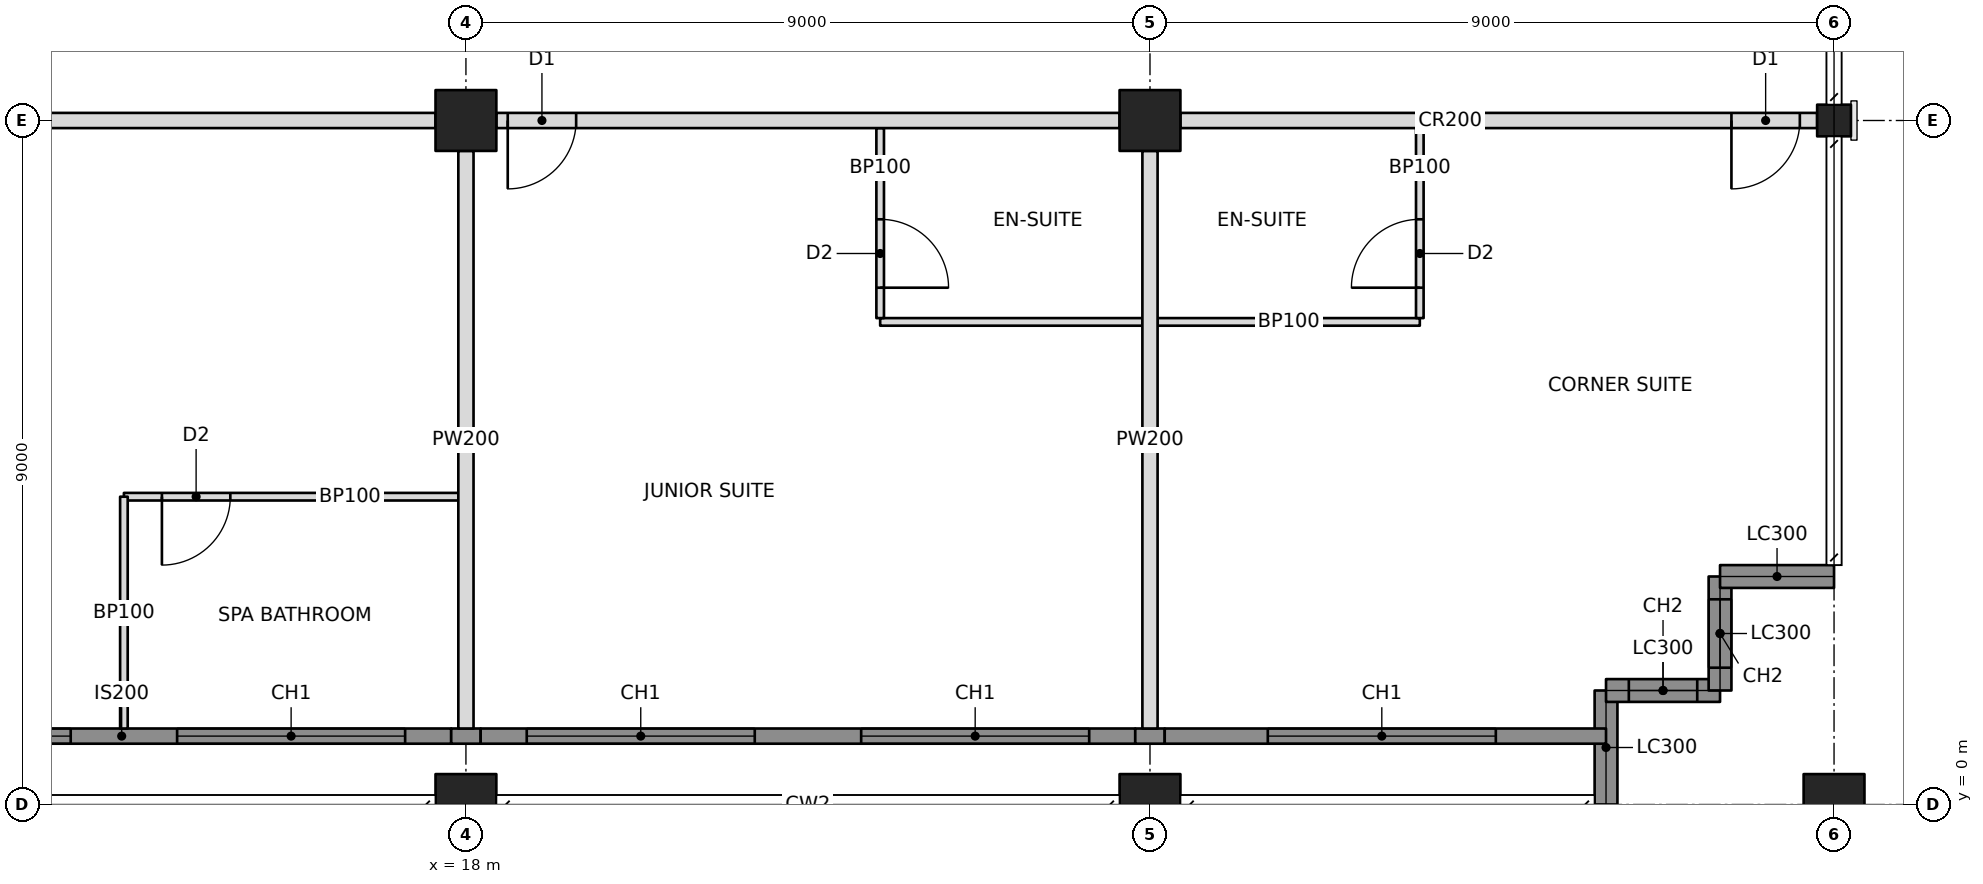
"""IFC4 building model, lengths in metres.
Left out: names, types, materials, properties, quantities, classifications, styles, units other than length and angle.
Written with IfcOpenShell. Run it as: python <this file> out.ifc"""

import sys

from ifc_helpers import new_model, si_unit, direction, frame, frame_2d, origin, origin_2d, place, context, subcontext, project, spatial, rectangle, hollow_rectangle, i_section, extrude, element, fill, save


model = new_model("IFC4")
c1 = context("Model", 3, precision=1e-05, world=origin(), true_north=direction((0.0, 1.0)))
c2 = subcontext(c1, "Body", "Model", "MODEL_VIEW")
j1 = project(units=[si_unit("LENGTHUNIT", "METRE"), si_unit("PLANEANGLEUNIT", "RADIAN")], contexts=[c1])
p1 = place(None, origin())
s1 = spatial("IfcSite", under=j1, at=p1, CompositionType="ELEMENT")
p2 = place(p1, origin())
s2 = spatial("IfcBuilding", under=s1, at=p2, CompositionType="ELEMENT")
p3 = place(p2, frame((0.0, 0.0, 248.2)))
s3 = spatial("IfcBuildingStorey", under=s2, at=p3, CompositionType="ELEMENT", Elevation=248.2)
for number, where, z_axis, x_axis in (
    (1, (18.0, 0.0, 0.0), (0.0, 0.0, 1.0), (1.0, 0.0, 0.0)),
    (2, (18.0, 9.0, 0.0), (0.0, 0.0, 1.0), (1.0, 0.0, 0.0)),
    (3, (27.0, 0.0, 0.0), (0.0, 0.0, 1.0), (1.0, 0.0, 0.0)),
    (4, (27.0, 9.0, 0.0), (0.0, 0.0, 1.0), (1.0, 0.0, 0.0)),
    (5, (36.0, 0.0, 0.0), (0.0, 0.0, 1.0), (1.0, 0.0, 0.0)),
):
    element("IfcColumn", number, at=place(p3, frame(where, z_axis=z_axis, x_axis=x_axis)), inside=s3, PredefinedType="COLUMN", context=c2, shape_type="SweptSolid", body=[
        extrude(hollow_rectangle(XDim=0.8, YDim=0.8, WallThickness=0.032, at=origin_2d()), origin(), (0.0, 0.0, 1.0), 3.6),
    ])
p4 = place(p3, frame((36.0, 9.0, 0.0), z_axis=(0.0, 0.0, 1.0), x_axis=(0.0, 1.0, 0.0)))
e6 = element("IfcColumn", 6, at=p4, inside=s3, PredefinedType="COLUMN", context=c2, shape_type="SweptSolid", body=[
    extrude(i_section(OverallWidth=0.417, OverallDepth=0.445, WebThickness=0.039, FlangeThickness=0.063, at=origin_2d()), origin(), (0.0, 0.0, 1.0), 3.6),
])
p5 = place(p3, frame((33.0, 0.0, 0.0), z_axis=(0.0, 0.0, 1.0), x_axis=(0.0, 1.0, 0.0)))
e7 = element("IfcWall", 7, at=p5, inside=s3, PredefinedType="SOLIDWALL", context=c2, shape_type="SweptSolid", body=[
    extrude(rectangle(XDim=1.5, YDim=0.3, at=frame_2d((0.75, 0.0))), origin(), (0.0, 0.0, 1.0), 2.62),
])
p6 = place(p3, frame((33.0, 1.5, 0.0), z_axis=(0.0, 0.0, 1.0), x_axis=(1.0, 0.0, 0.0)))
e8 = element("IfcWall", 8, at=p6, inside=s3, PredefinedType="SOLIDWALL", context=c2, shape_type="SweptSolid", body=[
    extrude(rectangle(XDim=1.5, YDim=0.3, at=frame_2d((0.75, 0.0))), origin(), (0.0, 0.0, 1.0), 3.4),
])
p7 = place(p6, frame((0.3, 0.0, 0.6)))
e9 = element("IfcOpeningElement", 9, at=p7, cuts=e8, PredefinedType="OPENING", context=c2, shape_type="SweptSolid", body=[
    extrude(rectangle(XDim=0.9, YDim=2.2, at=frame_2d((0.45, 1.1))), frame((0.0, 0.16, 0.0), z_axis=(0.0, -1.0, 0.0), x_axis=(1.0, 0.0, 0.0)), (0.0, 0.0, 1.0), 0.32),
])
p8 = place(p3, frame((34.5, 1.5, 0.0), z_axis=(0.0, 0.0, 1.0), x_axis=(0.0, 1.0, 0.0)))
e10 = element("IfcWall", 10, at=p8, inside=s3, PredefinedType="SOLIDWALL", context=c2, shape_type="SweptSolid", body=[
    extrude(rectangle(XDim=1.5, YDim=0.3, at=frame_2d((0.75, 0.0))), origin(), (0.0, 0.0, 1.0), 3.4),
])
p9 = place(p8, frame((0.3, 0.0, 0.6)))
e11 = element("IfcOpeningElement", 11, at=p9, cuts=e10, PredefinedType="OPENING", context=c2, shape_type="SweptSolid", body=[
    extrude(rectangle(XDim=0.9, YDim=2.2, at=frame_2d((0.45, 1.1))), frame((0.0, 0.16, 0.0), z_axis=(0.0, -1.0, 0.0), x_axis=(1.0, 0.0, 0.0)), (0.0, 0.0, 1.0), 0.32),
])
p10 = place(p3, frame((34.5, 3.0, 0.0), z_axis=(0.0, 0.0, 1.0), x_axis=(1.0, 0.0, 0.0)))
e12 = element("IfcWall", 12, at=p10, inside=s3, PredefinedType="SOLIDWALL", context=c2, shape_type="SweptSolid", body=[
    extrude(rectangle(XDim=1.5, YDim=0.3, at=frame_2d((0.75, 0.0))), origin(), (0.0, 0.0, 1.0), 2.62),
])
p11 = place(p3, frame((9.4, 9.0, 0.0), z_axis=(0.0, 0.0, 1.0), x_axis=(1.0, 0.0, 0.0)))
e13 = element("IfcWall", 13, at=p11, inside=s3, PredefinedType="PARTITIONING", context=c2, shape_type="SweptSolid", body=[
    extrude(rectangle(XDim=8.2, YDim=0.2, at=frame_2d((4.1, 0.0))), origin(), (0.0, 0.0, 1.0), 2.605),
])
p12 = place(p11, frame((0.15, 0.0, 0.0)))
e14 = element("IfcOpeningElement", 14, at=p12, cuts=e13, PredefinedType="OPENING", context=c2, shape_type="SweptSolid", body=[
    extrude(rectangle(XDim=0.9, YDim=2.1, at=frame_2d((0.45, 1.05))), frame((0.0, 0.11, 0.0), z_axis=(0.0, -1.0, 0.0), x_axis=(1.0, 0.0, 0.0)), (0.0, 0.0, 1.0), 0.22),
])
p13 = place(p3, frame((18.4, 9.0, 0.0), z_axis=(0.0, 0.0, 1.0), x_axis=(1.0, 0.0, 0.0)))
e15 = element("IfcWall", 15, at=p13, inside=s3, PredefinedType="PARTITIONING", context=c2, shape_type="SweptSolid", body=[
    extrude(rectangle(XDim=8.2, YDim=0.2, at=frame_2d((4.1, 0.0))), origin(), (0.0, 0.0, 1.0), 2.605),
])
p14 = place(p13, frame((0.15, 0.0, 0.0)))
e16 = element("IfcOpeningElement", 16, at=p14, cuts=e15, PredefinedType="OPENING", context=c2, shape_type="SweptSolid", body=[
    extrude(rectangle(XDim=0.9, YDim=2.1, at=frame_2d((0.45, 1.05))), frame((0.0, 0.11, 0.0), z_axis=(0.0, -1.0, 0.0), x_axis=(1.0, 0.0, 0.0)), (0.0, 0.0, 1.0), 0.22),
])
p15 = place(p3, frame((27.4, 9.0, 0.0), z_axis=(0.0, 0.0, 1.0), x_axis=(1.0, 0.0, 0.0)))
e17 = element("IfcWall", 17, at=p15, inside=s3, PredefinedType="PARTITIONING", context=c2, shape_type="SweptSolid", body=[
    extrude(rectangle(XDim=8.378, YDim=0.2, at=frame_2d((4.189, 0.0))), origin(), (0.0, 0.0, 1.0), 2.605),
])
p16 = place(p15, frame((7.25, 0.0, 0.0)))
e18 = element("IfcOpeningElement", 18, at=p16, cuts=e17, PredefinedType="OPENING", context=c2, shape_type="SweptSolid", body=[
    extrude(rectangle(XDim=0.9, YDim=2.1, at=frame_2d((0.45, 1.05))), frame((0.0, 0.11, 0.0), z_axis=(0.0, -1.0, 0.0), x_axis=(1.0, 0.0, 0.0)), (0.0, 0.0, 1.0), 0.22),
])
for number, where, z_axis, x_axis in (
    (19, (18.0, 8.6, 0.0), (0.0, 0.0, 1.0), (0.0, -1.0, 0.0)),
    (20, (27.0, 8.6, 0.0), (0.0, 0.0, 1.0), (0.0, -1.0, 0.0)),
):
    element("IfcWall", number, at=place(p3, frame(where, z_axis=z_axis, x_axis=x_axis)), inside=s3, PredefinedType="PARTITIONING", context=c2, shape_type="SweptSolid", body=[
        extrude(rectangle(XDim=7.6, YDim=0.2, at=frame_2d((3.8, 0.0))), origin(), (0.0, 0.0, 1.0), 2.605),
    ])
p17 = place(p3, frame((13.5, 4.05, 0.0), z_axis=(0.0, 0.0, 1.0), x_axis=(1.0, 0.0, 0.0)))
e21 = element("IfcWall", 21, at=p17, inside=s3, PredefinedType="PARTITIONING", context=c2, shape_type="SweptSolid", body=[
    extrude(rectangle(XDim=4.4, YDim=0.1, at=frame_2d((2.2, 0.0))), origin(), (0.0, 0.0, 1.0), 2.604),
])
p18 = place(p17, frame((0.5, 0.0, 0.0)))
e22 = element("IfcOpeningElement", 22, at=p18, cuts=e21, PredefinedType="OPENING", context=c2, shape_type="SweptSolid", body=[
    extrude(rectangle(XDim=0.9, YDim=2.1, at=frame_2d((0.45, 1.05))), frame((0.0, 0.06, 0.0), z_axis=(0.0, -1.0, 0.0), x_axis=(1.0, 0.0, 0.0)), (0.0, 0.0, 1.0), 0.12),
])
p19 = place(p3, frame((13.5, 4.05, 0.0), z_axis=(0.0, 0.0, 1.0), x_axis=(0.0, -1.0, 0.0)))
e23 = element("IfcWall", 23, at=p19, inside=s3, PredefinedType="PARTITIONING", context=c2, shape_type="SweptSolid", body=[
    extrude(rectangle(XDim=3.05, YDim=0.1, at=frame_2d((1.525, 0.0))), origin(), (0.0, 0.0, 1.0), 3.4),
])
p20 = place(p3, frame((23.45, 6.35, 0.0), z_axis=(0.0, 0.0, 1.0), x_axis=(1.0, 0.0, 0.0)))
e24 = element("IfcWall", 24, at=p20, inside=s3, PredefinedType="PARTITIONING", context=c2, shape_type="SweptSolid", body=[
    extrude(rectangle(XDim=3.45, YDim=0.1, at=frame_2d((1.725, 0.0))), origin(), (0.0, 0.0, 1.0), 2.604),
])
p21 = place(p3, frame((23.45, 8.9, 0.0), z_axis=(0.0, 0.0, 1.0), x_axis=(0.0, -1.0, 0.0)))
e25 = element("IfcWall", 25, at=p21, inside=s3, PredefinedType="PARTITIONING", context=c2, shape_type="SweptSolid", body=[
    extrude(rectangle(XDim=2.5, YDim=0.1, at=frame_2d((1.25, 0.0))), origin(), (0.0, 0.0, 1.0), 2.604),
])
p22 = place(p21, frame((1.2, 0.0, 0.0)))
e26 = element("IfcOpeningElement", 26, at=p22, cuts=e25, PredefinedType="OPENING", context=c2, shape_type="SweptSolid", body=[
    extrude(rectangle(XDim=0.9, YDim=2.1, at=frame_2d((0.45, 1.05))), frame((0.0, 0.06, 0.0), z_axis=(0.0, -1.0, 0.0), x_axis=(1.0, 0.0, 0.0)), (0.0, 0.0, 1.0), 0.12),
])
p23 = place(p3, frame((27.1, 6.35, 0.0), z_axis=(0.0, 0.0, 1.0), x_axis=(1.0, 0.0, 0.0)))
e27 = element("IfcWall", 27, at=p23, inside=s3, PredefinedType="PARTITIONING", context=c2, shape_type="SweptSolid", body=[
    extrude(rectangle(XDim=3.45, YDim=0.1, at=frame_2d((1.725, 0.0))), origin(), (0.0, 0.0, 1.0), 2.604),
])
p24 = place(p3, frame((30.55, 8.9, 0.0), z_axis=(0.0, 0.0, 1.0), x_axis=(0.0, -1.0, 0.0)))
e28 = element("IfcWall", 28, at=p24, inside=s3, PredefinedType="PARTITIONING", context=c2, shape_type="SweptSolid", body=[
    extrude(rectangle(XDim=2.5, YDim=0.1, at=frame_2d((1.25, 0.0))), origin(), (0.0, 0.0, 1.0), 2.604),
])
p25 = place(p24, frame((1.2, 0.0, 0.0)))
e29 = element("IfcOpeningElement", 29, at=p25, cuts=e28, PredefinedType="OPENING", context=c2, shape_type="SweptSolid", body=[
    extrude(rectangle(XDim=0.9, YDim=2.1, at=frame_2d((0.45, 1.05))), frame((0.0, 0.06, 0.0), z_axis=(0.0, -1.0, 0.0), x_axis=(1.0, 0.0, 0.0)), (0.0, 0.0, 1.0), 0.12),
])
p26 = place(p3, frame((9.135, 0.9, 0.0), z_axis=(0.0, 0.0, 1.0), x_axis=(1.0, 0.0, 0.0)))
e30 = element("IfcWall", 30, at=p26, inside=s3, PredefinedType="SOLIDWALL", context=c2, shape_type="SweptSolid", body=[
    extrude(rectangle(XDim=8.671, YDim=0.2, at=frame_2d((4.335, 0.0))), origin(), (0.0, 0.0, 1.0), 3.4),
])
p27 = place(p26, frame((0.665, 0.0, 0.6)))
e31 = element("IfcOpeningElement", 31, at=p27, cuts=e30, PredefinedType="OPENING", context=c2, shape_type="SweptSolid", body=[
    extrude(rectangle(XDim=3.0, YDim=2.2, at=frame_2d((1.5, 1.1))), frame((0.0, 0.11, 0.0), z_axis=(0.0, -1.0, 0.0), x_axis=(1.0, 0.0, 0.0)), (0.0, 0.0, 1.0), 0.22),
])
p28 = place(p26, frame((5.065, 0.0, 0.6)))
e32 = element("IfcOpeningElement", 32, at=p28, cuts=e30, PredefinedType="OPENING", context=c2, shape_type="SweptSolid", body=[
    extrude(rectangle(XDim=3.0, YDim=2.2, at=frame_2d((1.5, 1.1))), frame((0.0, 0.11, 0.0), z_axis=(0.0, -1.0, 0.0), x_axis=(1.0, 0.0, 0.0)), (0.0, 0.0, 1.0), 0.22),
])
p29 = place(p3, frame((17.806, 0.9, 0.0), z_axis=(0.0, 0.0, 1.0), x_axis=(1.0, 0.0, 0.0)))
e33 = element("IfcWall", 33, at=p29, inside=s3, PredefinedType="SOLIDWALL", context=c2, shape_type="SweptSolid", body=[
    extrude(rectangle(XDim=0.388, YDim=0.2, at=frame_2d((0.194, 0.0))), origin(), (0.0, 0.0, 1.0), 2.604),
])
p30 = place(p3, frame((18.194, 0.9, 0.0), z_axis=(0.0, 0.0, 1.0), x_axis=(1.0, 0.0, 0.0)))
e34 = element("IfcWall", 34, at=p30, inside=s3, PredefinedType="SOLIDWALL", context=c2, shape_type="SweptSolid", body=[
    extrude(rectangle(XDim=8.612, YDim=0.2, at=frame_2d((4.306, 0.0))), origin(), (0.0, 0.0, 1.0), 3.4),
])
p31 = place(p30, frame((0.606, 0.0, 0.6)))
e35 = element("IfcOpeningElement", 35, at=p31, cuts=e34, PredefinedType="OPENING", context=c2, shape_type="SweptSolid", body=[
    extrude(rectangle(XDim=3.0, YDim=2.2, at=frame_2d((1.5, 1.1))), frame((0.0, 0.11, 0.0), z_axis=(0.0, -1.0, 0.0), x_axis=(1.0, 0.0, 0.0)), (0.0, 0.0, 1.0), 0.22),
])
p32 = place(p30, frame((5.006, 0.0, 0.6)))
e36 = element("IfcOpeningElement", 36, at=p32, cuts=e34, PredefinedType="OPENING", context=c2, shape_type="SweptSolid", body=[
    extrude(rectangle(XDim=3.0, YDim=2.2, at=frame_2d((1.5, 1.1))), frame((0.0, 0.11, 0.0), z_axis=(0.0, -1.0, 0.0), x_axis=(1.0, 0.0, 0.0)), (0.0, 0.0, 1.0), 0.22),
])
p33 = place(p3, frame((26.806, 0.9, 0.0), z_axis=(0.0, 0.0, 1.0), x_axis=(1.0, 0.0, 0.0)))
e37 = element("IfcWall", 37, at=p33, inside=s3, PredefinedType="SOLIDWALL", context=c2, shape_type="SweptSolid", body=[
    extrude(rectangle(XDim=0.388, YDim=0.2, at=frame_2d((0.194, 0.0))), origin(), (0.0, 0.0, 1.0), 2.604),
])
p34 = place(p3, frame((27.194, 0.9, 0.0), z_axis=(0.0, 0.0, 1.0), x_axis=(1.0, 0.0, 0.0)))
e38 = element("IfcWall", 38, at=p34, inside=s3, PredefinedType="SOLIDWALL", context=c2, shape_type="SweptSolid", body=[
    extrude(rectangle(XDim=5.806, YDim=0.2, at=frame_2d((2.903, 0.0))), origin(), (0.0, 0.0, 1.0), 3.4),
])
p35 = place(p34, frame((1.356, 0.0, 0.6)))
e39 = element("IfcOpeningElement", 39, at=p35, cuts=e38, PredefinedType="OPENING", context=c2, shape_type="SweptSolid", body=[
    extrude(rectangle(XDim=3.0, YDim=2.2, at=frame_2d((1.5, 1.1))), frame((0.0, 0.11, 0.0), z_axis=(0.0, -1.0, 0.0), x_axis=(1.0, 0.0, 0.0)), (0.0, 0.0, 1.0), 0.22),
])
p36 = place(p7, origin())
e40 = element("IfcWindow", 40, at=p36, inside=s3, PartitioningType="SINGLE_PANEL", PredefinedType="WINDOW", context=c2, shape_type="SweptSolid", body=[
    extrude(rectangle(XDim=0.9, YDim=2.2, at=frame_2d((0.45, 1.1))), frame((0.0, 0.03, 0.0), z_axis=(0.0, -1.0, 0.0), x_axis=(1.0, 0.0, 0.0)), (0.0, 0.0, 1.0), 0.06),
])
fill(e9, e40)
p37 = place(p9, origin())
e41 = element("IfcWindow", 41, at=p37, inside=s3, PartitioningType="SINGLE_PANEL", PredefinedType="WINDOW", context=c2, shape_type="SweptSolid", body=[
    extrude(rectangle(XDim=0.9, YDim=2.2, at=frame_2d((0.45, 1.1))), frame((0.0, 0.03, 0.0), z_axis=(0.0, -1.0, 0.0), x_axis=(1.0, 0.0, 0.0)), (0.0, 0.0, 1.0), 0.06),
])
fill(e11, e41)
p38 = place(p27, origin())
e42 = element("IfcWindow", 42, at=p38, inside=s3, PartitioningType="TRIPLE_PANEL_VERTICAL", PredefinedType="WINDOW", context=c2, shape_type="SweptSolid", body=[
    extrude(rectangle(XDim=3.0, YDim=2.2, at=frame_2d((1.5, 1.1))), frame((0.0, 0.03, 0.0), z_axis=(0.0, -1.0, 0.0), x_axis=(1.0, 0.0, 0.0)), (0.0, 0.0, 1.0), 0.06),
])
fill(e31, e42)
p39 = place(p28, origin())
e43 = element("IfcWindow", 43, at=p39, inside=s3, PartitioningType="TRIPLE_PANEL_VERTICAL", PredefinedType="WINDOW", context=c2, shape_type="SweptSolid", body=[
    extrude(rectangle(XDim=3.0, YDim=2.2, at=frame_2d((1.5, 1.1))), frame((0.0, 0.03, 0.0), z_axis=(0.0, -1.0, 0.0), x_axis=(1.0, 0.0, 0.0)), (0.0, 0.0, 1.0), 0.06),
])
fill(e32, e43)
p40 = place(p31, origin())
e44 = element("IfcWindow", 44, at=p40, inside=s3, PartitioningType="TRIPLE_PANEL_VERTICAL", PredefinedType="WINDOW", context=c2, shape_type="SweptSolid", body=[
    extrude(rectangle(XDim=3.0, YDim=2.2, at=frame_2d((1.5, 1.1))), frame((0.0, 0.03, 0.0), z_axis=(0.0, -1.0, 0.0), x_axis=(1.0, 0.0, 0.0)), (0.0, 0.0, 1.0), 0.06),
])
fill(e35, e44)
p41 = place(p32, origin())
e45 = element("IfcWindow", 45, at=p41, inside=s3, PartitioningType="TRIPLE_PANEL_VERTICAL", PredefinedType="WINDOW", context=c2, shape_type="SweptSolid", body=[
    extrude(rectangle(XDim=3.0, YDim=2.2, at=frame_2d((1.5, 1.1))), frame((0.0, 0.03, 0.0), z_axis=(0.0, -1.0, 0.0), x_axis=(1.0, 0.0, 0.0)), (0.0, 0.0, 1.0), 0.06),
])
fill(e36, e45)
p42 = place(p35, origin())
e46 = element("IfcWindow", 46, at=p42, inside=s3, PartitioningType="TRIPLE_PANEL_VERTICAL", PredefinedType="WINDOW", context=c2, shape_type="SweptSolid", body=[
    extrude(rectangle(XDim=3.0, YDim=2.2, at=frame_2d((1.5, 1.1))), frame((0.0, 0.03, 0.0), z_axis=(0.0, -1.0, 0.0), x_axis=(1.0, 0.0, 0.0)), (0.0, 0.0, 1.0), 0.06),
])
fill(e39, e46)
p43 = place(p18, frame((0.9, 0.0, 0.0), z_axis=(0.0, 0.0, 1.0), x_axis=(-1.0, 0.0, 0.0)))
e47 = element("IfcDoor", 47, at=p43, inside=s3, OperationType="SINGLE_SWING_RIGHT", PredefinedType="DOOR", context=c2, shape_type="SweptSolid", body=[
    extrude(rectangle(XDim=0.9, YDim=2.1, at=frame_2d((0.45, 1.05))), frame((0.0, 0.025, 0.0), z_axis=(0.0, -1.0, 0.0), x_axis=(1.0, 0.0, 0.0)), (0.0, 0.0, 1.0), 0.05),
])
fill(e22, e47)
p44 = place(p22, origin())
e48 = element("IfcDoor", 48, at=p44, inside=s3, OperationType="SINGLE_SWING_RIGHT", PredefinedType="DOOR", context=c2, shape_type="SweptSolid", body=[
    extrude(rectangle(XDim=0.9, YDim=2.1, at=frame_2d((0.45, 1.05))), frame((0.0, 0.025, 0.0), z_axis=(0.0, -1.0, 0.0), x_axis=(1.0, 0.0, 0.0)), (0.0, 0.0, 1.0), 0.05),
])
fill(e26, e48)
p45 = place(p14, frame((0.9, 0.0, 0.0), z_axis=(0.0, 0.0, 1.0), x_axis=(-1.0, 0.0, 0.0)))
e49 = element("IfcDoor", 49, at=p45, inside=s3, OperationType="SINGLE_SWING_RIGHT", PredefinedType="DOOR", context=c2, shape_type="SweptSolid", body=[
    extrude(rectangle(XDim=0.9, YDim=2.1, at=frame_2d((0.45, 1.05))), frame((0.0, 0.025, 0.0), z_axis=(0.0, -1.0, 0.0), x_axis=(1.0, 0.0, 0.0)), (0.0, 0.0, 1.0), 0.05),
])
fill(e16, e49)
p46 = place(p25, frame((0.9, 0.0, 0.0), z_axis=(0.0, 0.0, 1.0), x_axis=(-1.0, 0.0, 0.0)))
e50 = element("IfcDoor", 50, at=p46, inside=s3, OperationType="SINGLE_SWING_LEFT", PredefinedType="DOOR", context=c2, shape_type="SweptSolid", body=[
    extrude(rectangle(XDim=0.9, YDim=2.1, at=frame_2d((0.45, 1.05))), frame((0.0, 0.025, 0.0), z_axis=(0.0, -1.0, 0.0), x_axis=(1.0, 0.0, 0.0)), (0.0, 0.0, 1.0), 0.05),
])
fill(e29, e50)
p47 = place(p16, frame((0.9, 0.0, 0.0), z_axis=(0.0, 0.0, 1.0), x_axis=(-1.0, 0.0, 0.0)))
e51 = element("IfcDoor", 51, at=p47, inside=s3, OperationType="SINGLE_SWING_RIGHT", PredefinedType="DOOR", context=c2, shape_type="SweptSolid", body=[
    extrude(rectangle(XDim=0.9, YDim=2.1, at=frame_2d((0.45, 1.05))), frame((0.0, 0.025, 0.0), z_axis=(0.0, -1.0, 0.0), x_axis=(1.0, 0.0, 0.0)), (0.0, 0.0, 1.0), 0.05),
])
fill(e18, e51)
save(model, sys.argv[1])
